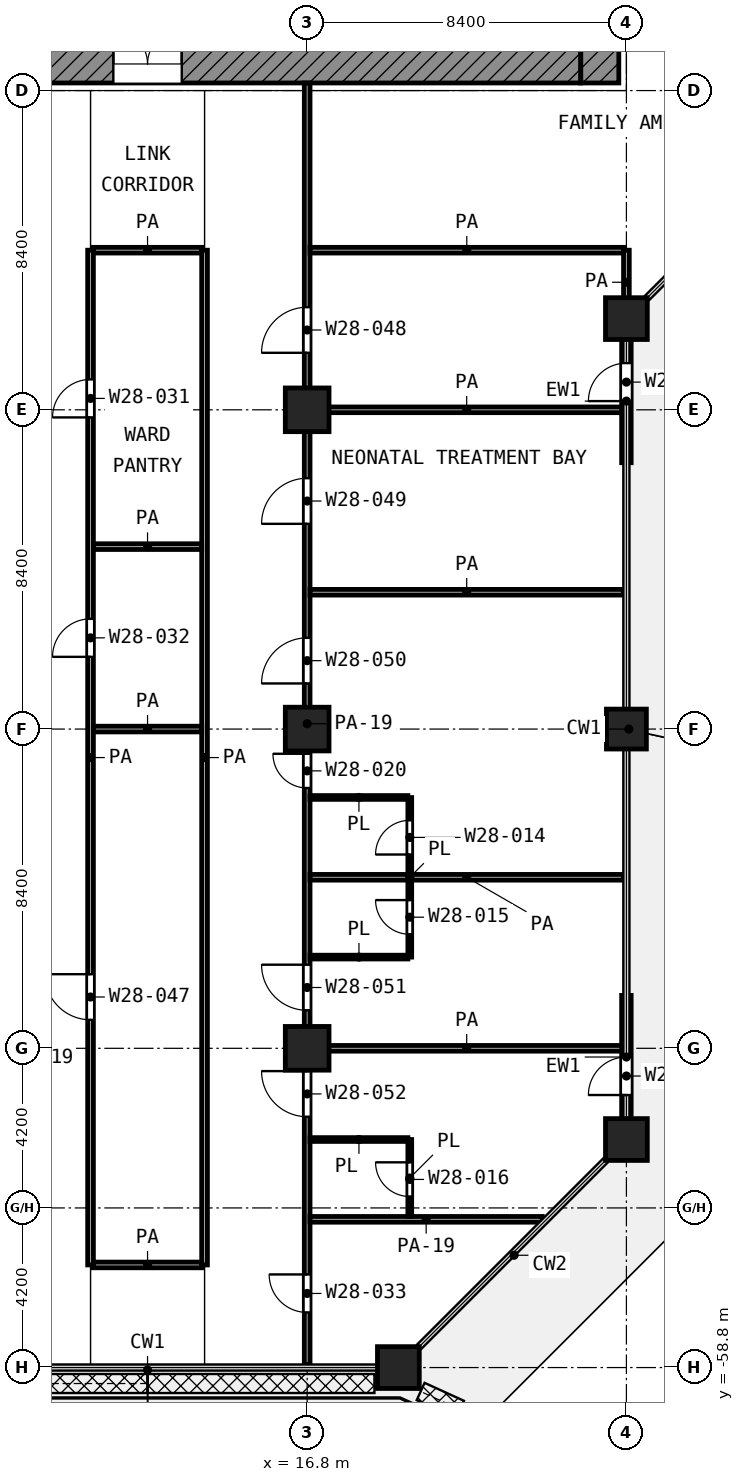
"""IFC4 building model, lengths in metres.
Left out: names, types, materials, properties, quantities, classifications, styles, units other than length and angle.
Written with IfcOpenShell. Run it as: python <this file> out.ifc"""

import sys

from ifc_helpers import new_model, si_unit, direction, frame, frame_2d, origin, origin_2d, place, context, subcontext, project, spatial, rectangle, extrude, element, fill, save


model = new_model("IFC4")
c1 = context("Model", 3, precision=1e-05, world=origin(), true_north=direction((0.0, 1.0)))
c2 = subcontext(c1, "Body", "Model", "MODEL_VIEW")
j1 = project(units=[si_unit("LENGTHUNIT", "METRE"), si_unit("PLANEANGLEUNIT", "RADIAN")], contexts=[c1])
p1 = place(None, origin())
s1 = spatial("IfcSite", under=j1, at=p1, CompositionType="ELEMENT")
p2 = place(p1, origin())
s2 = spatial("IfcBuilding", under=s1, at=p2, CompositionType="ELEMENT")
p3 = place(p2, frame((0.0, 0.0, 124.0)))
s3 = spatial("IfcBuildingStorey", under=s2, at=p3, CompositionType="ELEMENT", Elevation=124.0)
p4 = place(p3, frame((25.2, -31.2, 0.0), z_axis=(0.0, 0.0, 1.0), x_axis=(1.0, 0.0, 0.0)))
e1 = element("IfcColumn", 1, at=p4, inside=s3, PredefinedType="COLUMN", context=c2, shape_type="SweptSolid", body=[
    extrude(rectangle(XDim=1.1, YDim=1.1, at=origin_2d()), origin(), (0.0, 0.0, 1.0), 4.2),
])
for number, where, z_axis, x_axis in (
    (2, (16.8, -33.6, 0.0), (0.0, 0.0, 1.0), (1.0, 0.0, 0.0)),
    (3, (16.8, -42.0, 0.0), (0.0, 0.0, 1.0), (1.0, 0.0, 0.0)),
):
    element("IfcColumn", number, at=place(p3, frame(where, z_axis=z_axis, x_axis=x_axis)), inside=s3, PredefinedType="COLUMN", context=c2, shape_type="SweptSolid", body=[
        extrude(rectangle(XDim=1.15, YDim=1.15, at=origin_2d()), origin(), (0.0, 0.0, 1.0), 4.2),
    ])
p5 = place(p3, frame((25.2, -42.0, 0.0), z_axis=(0.0, 0.0, 1.0), x_axis=(1.0, 0.0, 0.0)))
e4 = element("IfcColumn", 4, at=p5, inside=s3, PredefinedType="COLUMN", context=c2, shape_type="SweptSolid", body=[
    extrude(rectangle(XDim=1.05, YDim=1.05, at=origin_2d()), origin(), (0.0, 0.0, 1.0), 4.2),
])
p6 = place(p3, frame((16.8, -50.4, 0.0), z_axis=(0.0, 0.0, 1.0), x_axis=(1.0, 0.0, 0.0)))
e5 = element("IfcColumn", 5, at=p6, inside=s3, PredefinedType="COLUMN", context=c2, shape_type="SweptSolid", body=[
    extrude(rectangle(XDim=1.15, YDim=1.15, at=origin_2d()), origin(), (0.0, 0.0, 1.0), 4.2),
])
for number, where, z_axis, x_axis in (
    (6, (25.2, -52.8, 0.0), (0.0, 0.0, 1.0), (1.0, 0.0, 0.0)),
    (7, (19.2, -58.8, 0.0), (0.0, 0.0, 1.0), (1.0, 0.0, 0.0)),
):
    element("IfcColumn", number, at=place(p3, frame(where, z_axis=z_axis, x_axis=x_axis)), inside=s3, PredefinedType="COLUMN", context=c2, shape_type="SweptSolid", body=[
        extrude(rectangle(XDim=1.1, YDim=1.1, at=origin_2d()), origin(), (0.0, 0.0, 1.0), 4.2),
    ])
p7 = place(p3, frame((25.2, -52.25, 0.0), z_axis=(0.0, 0.0, 1.0), x_axis=(0.0, 1.0, 0.0)))
e8 = element("IfcWall", 8, at=p7, inside=s3, PredefinedType="SOLIDWALL", context=c2, shape_type="SweptSolid", body=[
    extrude(rectangle(XDim=3.242, YDim=0.25, at=frame_2d((1.621, 0.0))), origin(), (0.0, 0.0, 1.0), 3.48),
])
p8 = place(p7, frame((0.621, 0.0, 0.0)))
e9 = element("IfcOpeningElement", 9, at=p8, cuts=e8, PredefinedType="OPENING", context=c2, shape_type="SweptSolid", body=[
    extrude(rectangle(XDim=1.0, YDim=2.1, at=frame_2d((0.5, 1.05))), frame((0.0, 0.135, 0.0), z_axis=(0.0, -1.0, 0.0), x_axis=(1.0, 0.0, 0.0)), (0.0, 0.0, 1.0), 0.27),
])
p9 = place(p3, frame((25.2, -34.992, 0.0), z_axis=(0.0, 0.0, 1.0), x_axis=(0.0, 1.0, 0.0)))
e10 = element("IfcWall", 10, at=p9, inside=s3, PredefinedType="SOLIDWALL", context=c2, shape_type="SweptSolid", body=[
    extrude(rectangle(XDim=3.242, YDim=0.25, at=frame_2d((1.621, 0.0))), origin(), (0.0, 0.0, 1.0), 3.48),
])
p10 = place(p9, frame((1.621, 0.0, 0.0)))
e11 = element("IfcOpeningElement", 11, at=p10, cuts=e10, PredefinedType="OPENING", context=c2, shape_type="SweptSolid", body=[
    extrude(rectangle(XDim=1.0, YDim=2.1, at=frame_2d((0.5, 1.05))), frame((0.0, 0.135, 0.0), z_axis=(0.0, -1.0, 0.0), x_axis=(1.0, 0.0, 0.0)), (0.0, 0.0, 1.0), 0.27),
])
p11 = place(p3, frame((5.4, -24.5, 0.0), z_axis=(0.0, 0.0, 1.0), x_axis=(1.0, 0.0, 0.0)))
e12 = element("IfcWall", 12, at=p11, inside=s3, PredefinedType="SHEAR", context=c2, shape_type="SweptSolid", body=[
    extrude(rectangle(XDim=18.6, YDim=1.0, at=frame_2d((9.3, 0.0))), origin(), (0.0, 0.0, 1.0), 3.6),
])
p12 = place(p11, frame((6.3, 0.0, 0.0)))
e13 = element("IfcOpeningElement", 13, at=p12, cuts=e12, PredefinedType="OPENING", context=c2, shape_type="SweptSolid", body=[
    extrude(rectangle(XDim=1.8, YDim=2.1, at=frame_2d((0.9, 1.05))), frame((0.0, 0.51, 0.0), z_axis=(0.0, -1.0, 0.0), x_axis=(1.0, 0.0, 0.0)), (0.0, 0.0, 1.0), 1.02),
])
p13 = place(p3, frame((24.5, -25.0, 0.0), z_axis=(0.0, 0.0, 1.0), x_axis=(0.0, 1.0, 0.0)))
e14 = element("IfcWall", 14, at=p13, inside=s3, PredefinedType="SHEAR", context=c2, shape_type="SweptSolid", body=[
    extrude(rectangle(XDim=1.0, YDim=1.0, at=frame_2d((0.5, 0.0))), origin(), (0.0, 0.0, 1.0), 3.6),
])
for number, where, z_axis, x_axis in (
    (15, (16.875, -52.8, 0.0), (0.0, 0.0, 1.0), (1.0, 0.0, 0.0)),
    (16, (16.875, -48.0, 0.0), (0.0, 0.0, 1.0), (1.0, 0.0, 0.0)),
):
    element("IfcWall", number, at=place(p3, frame(where, z_axis=z_axis, x_axis=x_axis)), inside=s3, PredefinedType="PARTITIONING", context=c2, shape_type="SweptSolid", body=[
        extrude(rectangle(XDim=2.575, YDim=0.1, at=frame_2d((1.288, 0.0))), origin(), (0.0, 0.0, 1.0), 3.6),
    ])
p14 = place(p3, frame((16.875, -43.8, 0.0), z_axis=(0.0, 0.0, 1.0), x_axis=(1.0, 0.0, 0.0)))
e17 = element("IfcWall", 17, at=p14, inside=s3, PredefinedType="PARTITIONING", context=c2, shape_type="SweptSolid", body=[
    extrude(rectangle(XDim=2.574, YDim=0.1, at=frame_2d((1.287, 0.0))), origin(), (0.0, 0.0, 1.0), 3.6),
])
p15 = place(p3, frame((19.5, -54.825, 0.0), z_axis=(0.0, 0.0, 1.0), x_axis=(0.0, 1.0, 0.0)))
e18 = element("IfcWall", 18, at=p15, inside=s3, PredefinedType="PARTITIONING", context=c2, shape_type="SweptSolid", body=[
    extrude(rectangle(XDim=2.025, YDim=0.1, at=frame_2d((1.012, 0.0))), origin(), (0.0, 0.0, 1.0), 3.6),
])
p16 = place(p15, frame((0.525, 0.0, 0.0)))
e19 = element("IfcOpeningElement", 19, at=p16, cuts=e18, PredefinedType="OPENING", context=c2, shape_type="SweptSolid", body=[
    extrude(rectangle(XDim=0.9, YDim=2.1, at=frame_2d((0.45, 1.05))), frame((0.0, 0.06, 0.0), z_axis=(0.0, -1.0, 0.0), x_axis=(1.0, 0.0, 0.0)), (0.0, 0.0, 1.0), 0.12),
])
p17 = place(p3, frame((19.5, -48.0, 0.0), z_axis=(0.0, 0.0, 1.0), x_axis=(0.0, 1.0, 0.0)))
e20 = element("IfcWall", 20, at=p17, inside=s3, PredefinedType="PARTITIONING", context=c2, shape_type="SweptSolid", body=[
    extrude(rectangle(XDim=4.198, YDim=0.1, at=frame_2d((2.099, 0.0))), origin(), (0.0, 0.0, 1.0), 3.6),
])
p18 = place(p17, frame((2.699, 0.0, 0.0)))
e21 = element("IfcOpeningElement", 21, at=p18, cuts=e20, PredefinedType="OPENING", context=c2, shape_type="SweptSolid", body=[
    extrude(rectangle(XDim=0.9, YDim=2.1, at=frame_2d((0.45, 1.05))), frame((0.0, 0.06, 0.0), z_axis=(0.0, -1.0, 0.0), x_axis=(1.0, 0.0, 0.0)), (0.0, 0.0, 1.0), 0.12),
])
p19 = place(p17, frame((0.6, 0.0, 0.0)))
e22 = element("IfcOpeningElement", 22, at=p19, cuts=e20, PredefinedType="OPENING", context=c2, shape_type="SweptSolid", body=[
    extrude(rectangle(XDim=0.9, YDim=2.1, at=frame_2d((0.45, 1.05))), frame((0.0, 0.06, 0.0), z_axis=(0.0, -1.0, 0.0), x_axis=(1.0, 0.0, 0.0)), (0.0, 0.0, 1.0), 0.12),
])
p20 = place(p3, frame((11.175, -56.1, 0.0), z_axis=(0.0, 0.0, 1.0), x_axis=(1.0, 0.0, 0.0)))
e23 = element("IfcWall", 23, at=p20, inside=s3, PredefinedType="PARTITIONING", context=c2, shape_type="SweptSolid", body=[
    extrude(rectangle(XDim=2.85, YDim=0.15, at=frame_2d((1.425, 0.0))), origin(), (0.0, 0.0, 1.0), 3.6),
])
p21 = place(p3, frame((16.875, -54.9, 0.0), z_axis=(0.0, 0.0, 1.0), x_axis=(1.0, 0.0, 0.0)))
e24 = element("IfcWall", 24, at=p21, inside=s3, PredefinedType="PARTITIONING", context=c2, shape_type="SweptSolid", body=[
    extrude(rectangle(XDim=6.112, YDim=0.15, at=frame_2d((3.056, 0.0))), origin(), (0.0, 0.0, 1.0), 2.7),
])
for number, where, z_axis, x_axis in (
    (25, (16.875, -50.4, 0.0), (0.0, 0.0, 1.0), (1.0, 0.0, 0.0)),
    (26, (16.875, -45.9, 0.0), (0.0, 0.0, 1.0), (1.0, 0.0, 0.0)),
):
    element("IfcWall", number, at=place(p3, frame(where, z_axis=z_axis, x_axis=x_axis)), inside=s3, PredefinedType="PARTITIONING", context=c2, shape_type="SweptSolid", body=[
        extrude(rectangle(XDim=8.245, YDim=0.15, at=frame_2d((4.123, 0.0))), origin(), (0.0, 0.0, 1.0), 3.6),
    ])
p22 = place(p3, frame((11.175, -42.0, 0.0), z_axis=(0.0, 0.0, 1.0), x_axis=(1.0, 0.0, 0.0)))
e27 = element("IfcWall", 27, at=p22, inside=s3, PredefinedType="PARTITIONING", context=c2, shape_type="SweptSolid", body=[
    extrude(rectangle(XDim=2.85, YDim=0.15, at=frame_2d((1.425, 0.0))), origin(), (0.0, 0.0, 1.0), 3.6),
])
p23 = place(p3, frame((16.875, -38.4, 0.0), z_axis=(0.0, 0.0, 1.0), x_axis=(1.0, 0.0, 0.0)))
e28 = element("IfcWall", 28, at=p23, inside=s3, PredefinedType="PARTITIONING", context=c2, shape_type="SweptSolid", body=[
    extrude(rectangle(XDim=8.245, YDim=0.15, at=frame_2d((4.123, 0.0))), origin(), (0.0, 0.0, 1.0), 3.6),
])
p24 = place(p3, frame((11.175, -37.2, 0.0), z_axis=(0.0, 0.0, 1.0), x_axis=(1.0, 0.0, 0.0)))
e29 = element("IfcWall", 29, at=p24, inside=s3, PredefinedType="PARTITIONING", context=c2, shape_type="SweptSolid", body=[
    extrude(rectangle(XDim=2.85, YDim=0.15, at=frame_2d((1.425, 0.0))), origin(), (0.0, 0.0, 1.0), 3.6),
])
p25 = place(p3, frame((16.875, -33.6, 0.0), z_axis=(0.0, 0.0, 1.0), x_axis=(1.0, 0.0, 0.0)))
e30 = element("IfcWall", 30, at=p25, inside=s3, PredefinedType="PARTITIONING", context=c2, shape_type="SweptSolid", body=[
    extrude(rectangle(XDim=8.245, YDim=0.15, at=frame_2d((4.123, 0.0))), origin(), (0.0, 0.0, 1.0), 3.6),
])
p26 = place(p3, frame((11.175, -29.4, 0.0), z_axis=(0.0, 0.0, 1.0), x_axis=(1.0, 0.0, 0.0)))
e31 = element("IfcWall", 31, at=p26, inside=s3, PredefinedType="PARTITIONING", context=c2, shape_type="SweptSolid", body=[
    extrude(rectangle(XDim=2.85, YDim=0.15, at=frame_2d((1.425, 0.0))), origin(), (0.0, 0.0, 1.0), 3.6),
])
p27 = place(p3, frame((16.875, -29.4, 0.0), z_axis=(0.0, 0.0, 1.0), x_axis=(1.0, 0.0, 0.0)))
e32 = element("IfcWall", 32, at=p27, inside=s3, PredefinedType="PARTITIONING", context=c2, shape_type="SweptSolid", body=[
    extrude(rectangle(XDim=8.25, YDim=0.15, at=frame_2d((4.125, 0.0))), origin(), (0.0, 0.0, 1.0), 3.6),
])
p28 = place(p3, frame((11.1, -56.1, 0.0), z_axis=(0.0, 0.0, 1.0), x_axis=(0.0, 1.0, 0.0)))
e33 = element("IfcWall", 33, at=p28, inside=s3, PredefinedType="PARTITIONING", context=c2, shape_type="SweptSolid", body=[
    extrude(rectangle(XDim=26.7, YDim=0.15, at=frame_2d((13.35, 0.0))), origin(), (0.0, 0.0, 1.0), 3.6),
])
p29 = place(p28, frame((22.3, 0.0, 0.0)))
e34 = element("IfcOpeningElement", 34, at=p29, cuts=e33, PredefinedType="OPENING", context=c2, shape_type="SweptSolid", body=[
    extrude(rectangle(XDim=1.0, YDim=2.1, at=frame_2d((0.5, 1.05))), frame((0.0, 0.085, 0.0), z_axis=(0.0, -1.0, 0.0), x_axis=(1.0, 0.0, 0.0)), (0.0, 0.0, 1.0), 0.17),
])
p30 = place(p28, frame((16.0, 0.0, 0.0)))
e35 = element("IfcOpeningElement", 35, at=p30, cuts=e33, PredefinedType="OPENING", context=c2, shape_type="SweptSolid", body=[
    extrude(rectangle(XDim=1.0, YDim=2.1, at=frame_2d((0.5, 1.05))), frame((0.0, 0.085, 0.0), z_axis=(0.0, -1.0, 0.0), x_axis=(1.0, 0.0, 0.0)), (0.0, 0.0, 1.0), 0.17),
])
p31 = place(p28, frame((6.45, 0.0, 0.0)))
e36 = element("IfcOpeningElement", 36, at=p31, cuts=e33, PredefinedType="OPENING", context=c2, shape_type="SweptSolid", body=[
    extrude(rectangle(XDim=1.2, YDim=2.1, at=frame_2d((0.6, 1.05))), frame((0.0, 0.085, 0.0), z_axis=(0.0, -1.0, 0.0), x_axis=(1.0, 0.0, 0.0)), (0.0, 0.0, 1.0), 0.17),
])
p32 = place(p3, frame((14.1, -56.1, 0.0), z_axis=(0.0, 0.0, 1.0), x_axis=(0.0, 1.0, 0.0)))
e37 = element("IfcWall", 37, at=p32, inside=s3, PredefinedType="PARTITIONING", context=c2, shape_type="SweptSolid", body=[
    extrude(rectangle(XDim=26.7, YDim=0.15, at=frame_2d((13.35, 0.0))), origin(), (0.0, 0.0, 1.0), 3.6),
])
p33 = place(p3, frame((16.8, -58.72, 0.0), z_axis=(0.0, 0.0, 1.0), x_axis=(0.0, 1.0, 0.0)))
e38 = element("IfcWall", 38, at=p33, inside=s3, PredefinedType="PARTITIONING", context=c2, shape_type="SweptSolid", body=[
    extrude(rectangle(XDim=33.72, YDim=0.15, at=frame_2d((16.86, 0.0))), origin(), (0.0, 0.0, 1.0), 2.7),
])
p34 = place(p33, frame((26.62, 0.0, 0.0)))
e39 = element("IfcOpeningElement", 39, at=p34, cuts=e38, PredefinedType="OPENING", context=c2, shape_type="SweptSolid", body=[
    extrude(rectangle(XDim=1.2, YDim=2.1, at=frame_2d((0.6, 1.05))), frame((0.0, 0.085, 0.0), z_axis=(0.0, -1.0, 0.0), x_axis=(1.0, 0.0, 0.0)), (0.0, 0.0, 1.0), 0.17),
])
p35 = place(p33, frame((22.12, 0.0, 0.0)))
e40 = element("IfcOpeningElement", 40, at=p35, cuts=e38, PredefinedType="OPENING", context=c2, shape_type="SweptSolid", body=[
    extrude(rectangle(XDim=1.2, YDim=2.1, at=frame_2d((0.6, 1.05))), frame((0.0, 0.085, 0.0), z_axis=(0.0, -1.0, 0.0), x_axis=(1.0, 0.0, 0.0)), (0.0, 0.0, 1.0), 0.17),
])
p36 = place(p33, frame((17.92, 0.0, 0.0)))
e41 = element("IfcOpeningElement", 41, at=p36, cuts=e38, PredefinedType="OPENING", context=c2, shape_type="SweptSolid", body=[
    extrude(rectangle(XDim=1.2, YDim=2.1, at=frame_2d((0.6, 1.05))), frame((0.0, 0.085, 0.0), z_axis=(0.0, -1.0, 0.0), x_axis=(1.0, 0.0, 0.0)), (0.0, 0.0, 1.0), 0.17),
])
p37 = place(p33, frame((15.17, 0.0, 0.0)))
e42 = element("IfcOpeningElement", 42, at=p37, cuts=e38, PredefinedType="OPENING", context=c2, shape_type="SweptSolid", body=[
    extrude(rectangle(XDim=0.9, YDim=2.1, at=frame_2d((0.45, 1.05))), frame((0.0, 0.085, 0.0), z_axis=(0.0, -1.0, 0.0), x_axis=(1.0, 0.0, 0.0)), (0.0, 0.0, 1.0), 0.17),
])
p38 = place(p33, frame((9.32, 0.0, 0.0)))
e43 = element("IfcOpeningElement", 43, at=p38, cuts=e38, PredefinedType="OPENING", context=c2, shape_type="SweptSolid", body=[
    extrude(rectangle(XDim=1.2, YDim=2.1, at=frame_2d((0.6, 1.05))), frame((0.0, 0.085, 0.0), z_axis=(0.0, -1.0, 0.0), x_axis=(1.0, 0.0, 0.0)), (0.0, 0.0, 1.0), 0.17),
])
p39 = place(p33, frame((6.52, 0.0, 0.0)))
e44 = element("IfcOpeningElement", 44, at=p39, cuts=e38, PredefinedType="OPENING", context=c2, shape_type="SweptSolid", body=[
    extrude(rectangle(XDim=1.2, YDim=2.1, at=frame_2d((0.6, 1.05))), frame((0.0, 0.085, 0.0), z_axis=(0.0, -1.0, 0.0), x_axis=(1.0, 0.0, 0.0)), (0.0, 0.0, 1.0), 0.17),
])
p40 = place(p33, frame((1.37, 0.0, 0.0)))
e45 = element("IfcOpeningElement", 45, at=p40, cuts=e38, PredefinedType="OPENING", context=c2, shape_type="SweptSolid", body=[
    extrude(rectangle(XDim=1.0, YDim=2.1, at=frame_2d((0.5, 1.05))), frame((0.0, 0.085, 0.0), z_axis=(0.0, -1.0, 0.0), x_axis=(1.0, 0.0, 0.0)), (0.0, 0.0, 1.0), 0.17),
])
p41 = place(p3, frame((25.2, -31.087, 0.0), z_axis=(0.0, 0.0, 1.0), x_axis=(0.0, 1.0, 0.0)))
e46 = element("IfcWall", 46, at=p41, inside=s3, PredefinedType="PARTITIONING", context=c2, shape_type="SweptSolid", body=[
    extrude(rectangle(XDim=1.687, YDim=0.15, at=frame_2d((0.844, 0.0))), origin(), (0.0, 0.0, 1.0), 3.6),
])
p42 = place(p8, origin())
e47 = element("IfcDoor", 47, at=p42, inside=s3, OperationType="SINGLE_SWING_LEFT", PredefinedType="DOOR", context=c2, shape_type="SweptSolid", body=[
    extrude(rectangle(XDim=1.0, YDim=2.1, at=frame_2d((0.5, 1.05))), frame((0.0, 0.025, 0.0), z_axis=(0.0, -1.0, 0.0), x_axis=(1.0, 0.0, 0.0)), (0.0, 0.0, 1.0), 0.05),
])
fill(e9, e47)
p43 = place(p10, origin())
e48 = element("IfcDoor", 48, at=p43, inside=s3, OperationType="SINGLE_SWING_LEFT", PredefinedType="DOOR", context=c2, shape_type="SweptSolid", body=[
    extrude(rectangle(XDim=1.0, YDim=2.1, at=frame_2d((0.5, 1.05))), frame((0.0, 0.025, 0.0), z_axis=(0.0, -1.0, 0.0), x_axis=(1.0, 0.0, 0.0)), (0.0, 0.0, 1.0), 0.05),
])
fill(e11, e48)
p44 = place(p12, origin())
e49 = element("IfcDoor", 49, at=p44, inside=s3, OperationType="DOUBLE_DOOR_SINGLE_SWING", PredefinedType="DOOR", context=c2, shape_type="SweptSolid", body=[
    extrude(rectangle(XDim=1.8, YDim=2.1, at=frame_2d((0.9, 1.05))), frame((0.0, 0.025, 0.0), z_axis=(0.0, -1.0, 0.0), x_axis=(1.0, 0.0, 0.0)), (0.0, 0.0, 1.0), 0.05),
])
fill(e13, e49)
p45 = place(p29, origin())
e50 = element("IfcDoor", 50, at=p45, inside=s3, OperationType="SINGLE_SWING_LEFT", PredefinedType="DOOR", context=c2, shape_type="SweptSolid", body=[
    extrude(rectangle(XDim=1.0, YDim=2.1, at=frame_2d((0.5, 1.05))), frame((0.0, 0.025, 0.0), z_axis=(0.0, -1.0, 0.0), x_axis=(1.0, 0.0, 0.0)), (0.0, 0.0, 1.0), 0.05),
])
fill(e34, e50)
p46 = place(p30, origin())
e51 = element("IfcDoor", 51, at=p46, inside=s3, OperationType="SINGLE_SWING_LEFT", PredefinedType="DOOR", context=c2, shape_type="SweptSolid", body=[
    extrude(rectangle(XDim=1.0, YDim=2.1, at=frame_2d((0.5, 1.05))), frame((0.0, 0.025, 0.0), z_axis=(0.0, -1.0, 0.0), x_axis=(1.0, 0.0, 0.0)), (0.0, 0.0, 1.0), 0.05),
])
fill(e35, e51)
p47 = place(p31, origin())
e52 = element("IfcDoor", 52, at=p47, inside=s3, OperationType="SINGLE_SWING_RIGHT", PredefinedType="DOOR", context=c2, shape_type="SweptSolid", body=[
    extrude(rectangle(XDim=1.2, YDim=2.1, at=frame_2d((0.6, 1.05))), frame((0.0, 0.025, 0.0), z_axis=(0.0, -1.0, 0.0), x_axis=(1.0, 0.0, 0.0)), (0.0, 0.0, 1.0), 0.05),
])
fill(e36, e52)
p48 = place(p34, origin())
e53 = element("IfcDoor", 53, at=p48, inside=s3, OperationType="SINGLE_SWING_LEFT", PredefinedType="DOOR", context=c2, shape_type="SweptSolid", body=[
    extrude(rectangle(XDim=1.2, YDim=2.1, at=frame_2d((0.6, 1.05))), frame((0.0, 0.025, 0.0), z_axis=(0.0, -1.0, 0.0), x_axis=(1.0, 0.0, 0.0)), (0.0, 0.0, 1.0), 0.05),
])
fill(e39, e53)
p49 = place(p35, origin())
e54 = element("IfcDoor", 54, at=p49, inside=s3, OperationType="SINGLE_SWING_LEFT", PredefinedType="DOOR", context=c2, shape_type="SweptSolid", body=[
    extrude(rectangle(XDim=1.2, YDim=2.1, at=frame_2d((0.6, 1.05))), frame((0.0, 0.025, 0.0), z_axis=(0.0, -1.0, 0.0), x_axis=(1.0, 0.0, 0.0)), (0.0, 0.0, 1.0), 0.05),
])
fill(e40, e54)
p50 = place(p36, origin())
e55 = element("IfcDoor", 55, at=p50, inside=s3, OperationType="SINGLE_SWING_LEFT", PredefinedType="DOOR", context=c2, shape_type="SweptSolid", body=[
    extrude(rectangle(XDim=1.2, YDim=2.1, at=frame_2d((0.6, 1.05))), frame((0.0, 0.025, 0.0), z_axis=(0.0, -1.0, 0.0), x_axis=(1.0, 0.0, 0.0)), (0.0, 0.0, 1.0), 0.05),
])
fill(e41, e55)
p51 = place(p37, origin())
e56 = element("IfcDoor", 56, at=p51, inside=s3, OperationType="SINGLE_SWING_RIGHT", PredefinedType="DOOR", context=c2, shape_type="SweptSolid", body=[
    extrude(rectangle(XDim=0.9, YDim=2.1, at=frame_2d((0.45, 1.05))), frame((0.0, 0.025, 0.0), z_axis=(0.0, -1.0, 0.0), x_axis=(1.0, 0.0, 0.0)), (0.0, 0.0, 1.0), 0.05),
])
fill(e42, e56)
p52 = place(p18, origin())
e57 = element("IfcDoor", 57, at=p52, inside=s3, OperationType="SINGLE_SWING_LEFT", PredefinedType="DOOR", context=c2, shape_type="SweptSolid", body=[
    extrude(rectangle(XDim=0.9, YDim=2.1, at=frame_2d((0.45, 1.05))), frame((0.0, 0.025, 0.0), z_axis=(0.0, -1.0, 0.0), x_axis=(1.0, 0.0, 0.0)), (0.0, 0.0, 1.0), 0.05),
])
fill(e21, e57)
p53 = place(p38, origin())
e58 = element("IfcDoor", 58, at=p53, inside=s3, OperationType="SINGLE_SWING_RIGHT", PredefinedType="DOOR", context=c2, shape_type="SweptSolid", body=[
    extrude(rectangle(XDim=1.2, YDim=2.1, at=frame_2d((0.6, 1.05))), frame((0.0, 0.025, 0.0), z_axis=(0.0, -1.0, 0.0), x_axis=(1.0, 0.0, 0.0)), (0.0, 0.0, 1.0), 0.05),
])
fill(e43, e58)
p54 = place(p19, origin())
e59 = element("IfcDoor", 59, at=p54, inside=s3, OperationType="SINGLE_SWING_RIGHT", PredefinedType="DOOR", context=c2, shape_type="SweptSolid", body=[
    extrude(rectangle(XDim=0.9, YDim=2.1, at=frame_2d((0.45, 1.05))), frame((0.0, 0.025, 0.0), z_axis=(0.0, -1.0, 0.0), x_axis=(1.0, 0.0, 0.0)), (0.0, 0.0, 1.0), 0.05),
])
fill(e22, e59)
p55 = place(p39, origin())
e60 = element("IfcDoor", 60, at=p55, inside=s3, OperationType="SINGLE_SWING_RIGHT", PredefinedType="DOOR", context=c2, shape_type="SweptSolid", body=[
    extrude(rectangle(XDim=1.2, YDim=2.1, at=frame_2d((0.6, 1.05))), frame((0.0, 0.025, 0.0), z_axis=(0.0, -1.0, 0.0), x_axis=(1.0, 0.0, 0.0)), (0.0, 0.0, 1.0), 0.05),
])
fill(e44, e60)
p56 = place(p16, origin())
e61 = element("IfcDoor", 61, at=p56, inside=s3, OperationType="SINGLE_SWING_RIGHT", PredefinedType="DOOR", context=c2, shape_type="SweptSolid", body=[
    extrude(rectangle(XDim=0.9, YDim=2.1, at=frame_2d((0.45, 1.05))), frame((0.0, 0.025, 0.0), z_axis=(0.0, -1.0, 0.0), x_axis=(1.0, 0.0, 0.0)), (0.0, 0.0, 1.0), 0.05),
])
fill(e19, e61)
p57 = place(p40, origin())
e62 = element("IfcDoor", 62, at=p57, inside=s3, OperationType="SINGLE_SWING_RIGHT", PredefinedType="DOOR", context=c2, shape_type="SweptSolid", body=[
    extrude(rectangle(XDim=1.0, YDim=2.1, at=frame_2d((0.5, 1.05))), frame((0.0, 0.025, 0.0), z_axis=(0.0, -1.0, 0.0), x_axis=(1.0, 0.0, 0.0)), (0.0, 0.0, 1.0), 0.05),
])
fill(e45, e62)
save(model, sys.argv[1])
